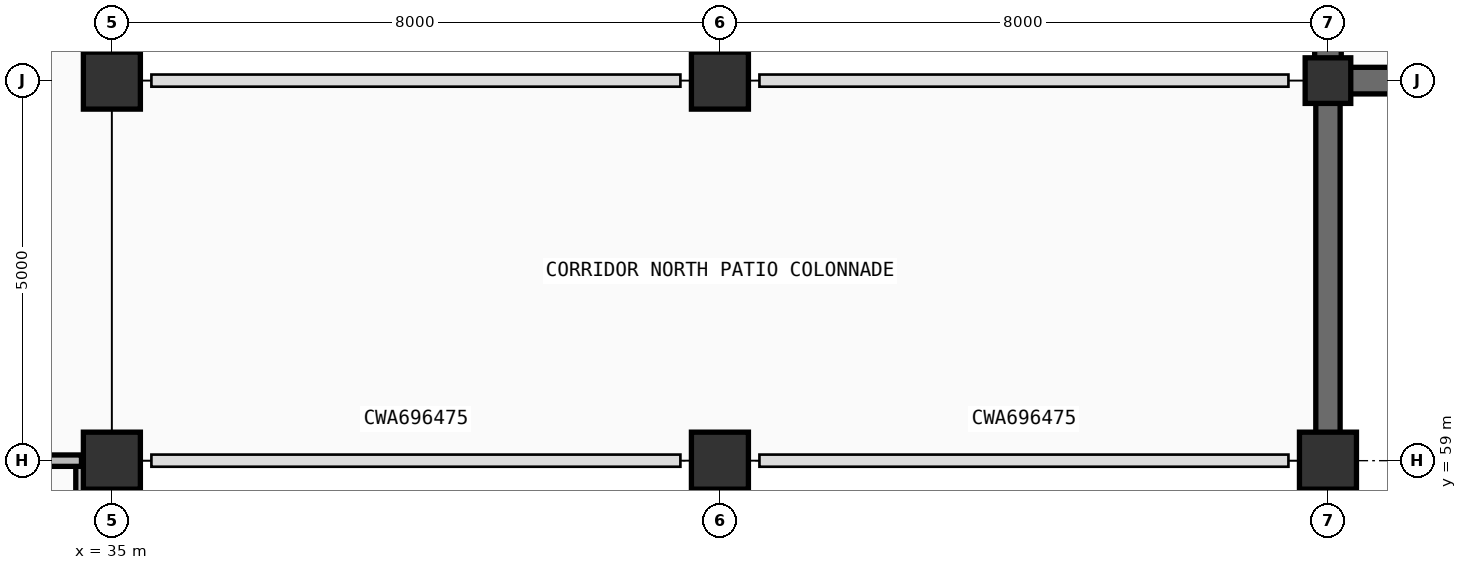
"""IFC4 building model, lengths in metres.
Left out: names, types, materials, properties, quantities, classifications, styles, units other than length and angle.
Written with IfcOpenShell. Run it as: python <this file> out.ifc"""

import sys

from ifc_helpers import new_model, si_unit, direction, frame, frame_2d, origin, origin_2d, place, context, subcontext, project, spatial, rectangle, circle, extrude, element, save


model = new_model("IFC4")
c1 = context("Model", 3, precision=1e-05, world=origin(), true_north=direction((0.0, 1.0)))
c2 = subcontext(c1, "Body", "Model", "MODEL_VIEW")
j1 = project(units=[si_unit("LENGTHUNIT", "METRE"), si_unit("PLANEANGLEUNIT", "RADIAN")], contexts=[c1])
p1 = place(None, origin())
s1 = spatial("IfcSite", under=j1, at=p1, CompositionType="ELEMENT")
p2 = place(p1, origin())
s2 = spatial("IfcBuilding", under=s1, at=p2, CompositionType="ELEMENT")
p3 = place(p2, origin())
s3 = spatial("IfcBuildingStorey", under=s2, at=p3, CompositionType="ELEMENT", Elevation=0.0)
for number, where, z_axis, x_axis in (
    (1, (35.0, 59.0, 0.0), (0.0, 0.0, 1.0), (1.0, 0.0, 0.0)),
    (2, (35.0, 64.0, 0.0), (0.0, 0.0, 1.0), (1.0, 0.0, 0.0)),
    (3, (43.0, 59.0, 0.0), (0.0, 0.0, 1.0), (1.0, 0.0, 0.0)),
    (4, (43.0, 64.0, 0.0), (0.0, 0.0, 1.0), (1.0, 0.0, 0.0)),
    (5, (51.0, 59.0, 0.0), (0.0, 0.0, 1.0), (1.0, 0.0, 0.0)),
):
    element("IfcColumn", number, at=place(p3, frame(where, z_axis=z_axis, x_axis=x_axis)), inside=s3, PredefinedType="COLUMN", context=c2, shape_type="SweptSolid", body=[
        extrude(rectangle(XDim=0.75, YDim=0.75, at=origin_2d()), origin(), (0.0, 0.0, 1.0), 5.4),
    ])
p4 = place(p3, frame((51.0, 64.0, 0.0), z_axis=(0.0, 0.0, 1.0), x_axis=(1.0, 0.0, 0.0)))
e6 = element("IfcColumn", 6, at=p4, inside=s3, PredefinedType="COLUMN", context=c2, shape_type="SweptSolid", body=[
    extrude(circle(Radius=0.3, at=origin_2d()), origin(), (0.0, 0.0, 1.0), 5.4),
])
p5 = place(p3, frame((35.0, 72.0, 0.0), z_axis=(0.0, 0.0, 1.0), x_axis=(0.0, -1.0, 0.0)))
e7 = element("IfcWall", 7, at=p5, inside=s3, PredefinedType="SOLIDWALL", context=c2, shape_type="SweptSolid", body=[
    extrude(rectangle(XDim=8.0, YDim=0.32, at=frame_2d((4.0, 0.0))), origin(), (0.0, 0.0, 1.0), 5.4),
])
p6 = place(p5, frame((2.8, 0.0, 1.1)))
e8 = element("IfcOpeningElement", 8, at=p6, cuts=e7, PredefinedType="OPENING", context=c2, shape_type="SweptSolid", body=[
    extrude(rectangle(XDim=2.4, YDim=1.1, at=frame_2d((1.2, 0.55))), frame((0.0, 0.17, 0.0), z_axis=(0.0, -1.0, 0.0), x_axis=(1.0, 0.0, 0.0)), (0.0, 0.0, 1.0), 0.34),
])
p7 = place(p3, frame((51.0, 64.0, 0.0), z_axis=(0.0, 0.0, 1.0), x_axis=(0.0, -1.0, 0.0)))
e9 = element("IfcWall", 9, at=p7, inside=s3, PredefinedType="SOLIDWALL", context=c2, shape_type="SweptSolid", body=[
    extrude(rectangle(XDim=5.0, YDim=0.32, at=frame_2d((2.5, 0.0))), origin(), (0.0, 0.0, 1.0), 5.4),
])
p8 = place(p3, frame((35.0, 59.0, 0.0), z_axis=(0.0, 0.0, 1.0), x_axis=(0.0, -1.0, 0.0)))
e10 = element("IfcWall", 10, at=p8, inside=s3, PredefinedType="SOLIDWALL", context=c2, shape_type="SweptSolid", body=[
    extrude(rectangle(XDim=8.0, YDim=0.32, at=frame_2d((4.0, 0.0))), origin(), (0.0, 0.0, 1.0), 5.4),
])
p9 = place(p8, frame((2.875, 0.0, 1.1)))
e11 = element("IfcOpeningElement", 11, at=p9, cuts=e10, PredefinedType="OPENING", context=c2, shape_type="SweptSolid", body=[
    extrude(rectangle(XDim=2.25, YDim=1.02, at=frame_2d((1.125, 0.51))), frame((0.0, 0.17, 0.0), z_axis=(0.0, -1.0, 0.0), x_axis=(1.0, 0.0, 0.0)), (0.0, 0.0, 1.0), 0.34),
])
p10 = place(p3, frame((59.0, 64.0, 0.0), z_axis=(0.0, 0.0, 1.0), x_axis=(-1.0, 0.0, 0.0)))
e12 = element("IfcWall", 12, at=p10, inside=s3, PredefinedType="SHEAR", context=c2, shape_type="SweptSolid", body=[
    extrude(rectangle(XDim=8.0, YDim=0.35, at=frame_2d((4.0, 0.0))), origin(), (0.0, 0.0, 1.0), 5.4),
])
p11 = place(p3, frame((51.0, 64.0, 0.0), z_axis=(0.0, 0.0, 1.0), x_axis=(0.0, 1.0, 0.0)))
e13 = element("IfcWall", 13, at=p11, inside=s3, PredefinedType="SHEAR", context=c2, shape_type="SweptSolid", body=[
    extrude(rectangle(XDim=8.0, YDim=0.35, at=frame_2d((4.0, 0.0))), origin(), (0.0, 0.0, 1.0), 5.4),
])
p12 = place(p11, frame((5.2, 0.0, 0.0)))
e14 = element("IfcOpeningElement", 14, at=p12, cuts=e13, PredefinedType="OPENING", context=c2, shape_type="SweptSolid", body=[
    extrude(rectangle(XDim=2.0, YDim=2.6, at=frame_2d((1.0, 1.3))), frame((0.0, 0.185, 0.0), z_axis=(0.0, -1.0, 0.0), x_axis=(1.0, 0.0, 0.0)), (0.0, 0.0, 1.0), 0.37),
])
p13 = place(p3, frame((34.6, 40.4, 0.0), z_axis=(0.0, 0.0, 1.0), x_axis=(0.0, 1.0, 0.0)))
e15 = element("IfcWall", 15, at=p13, inside=s3, PredefinedType="PARTITIONING", context=c2, shape_type="SweptSolid", body=[
    extrude(rectangle(XDim=18.6, YDim=0.15, at=frame_2d((9.3, 0.0))), origin(), (0.0, 0.0, 1.0), 4.405),
])
p14 = place(p3, frame((23.0, 59.0, 0.0), z_axis=(0.0, 0.0, 1.0), x_axis=(1.0, 0.0, 0.0)))
e16 = element("IfcWall", 16, at=p14, inside=s3, PredefinedType="PARTITIONING", context=c2, shape_type="SweptSolid", body=[
    extrude(rectangle(XDim=11.6, YDim=0.15, at=frame_2d((5.8, 0.0))), origin(), (0.0, 0.0, 1.0), 4.335),
])
save(model, sys.argv[1])
